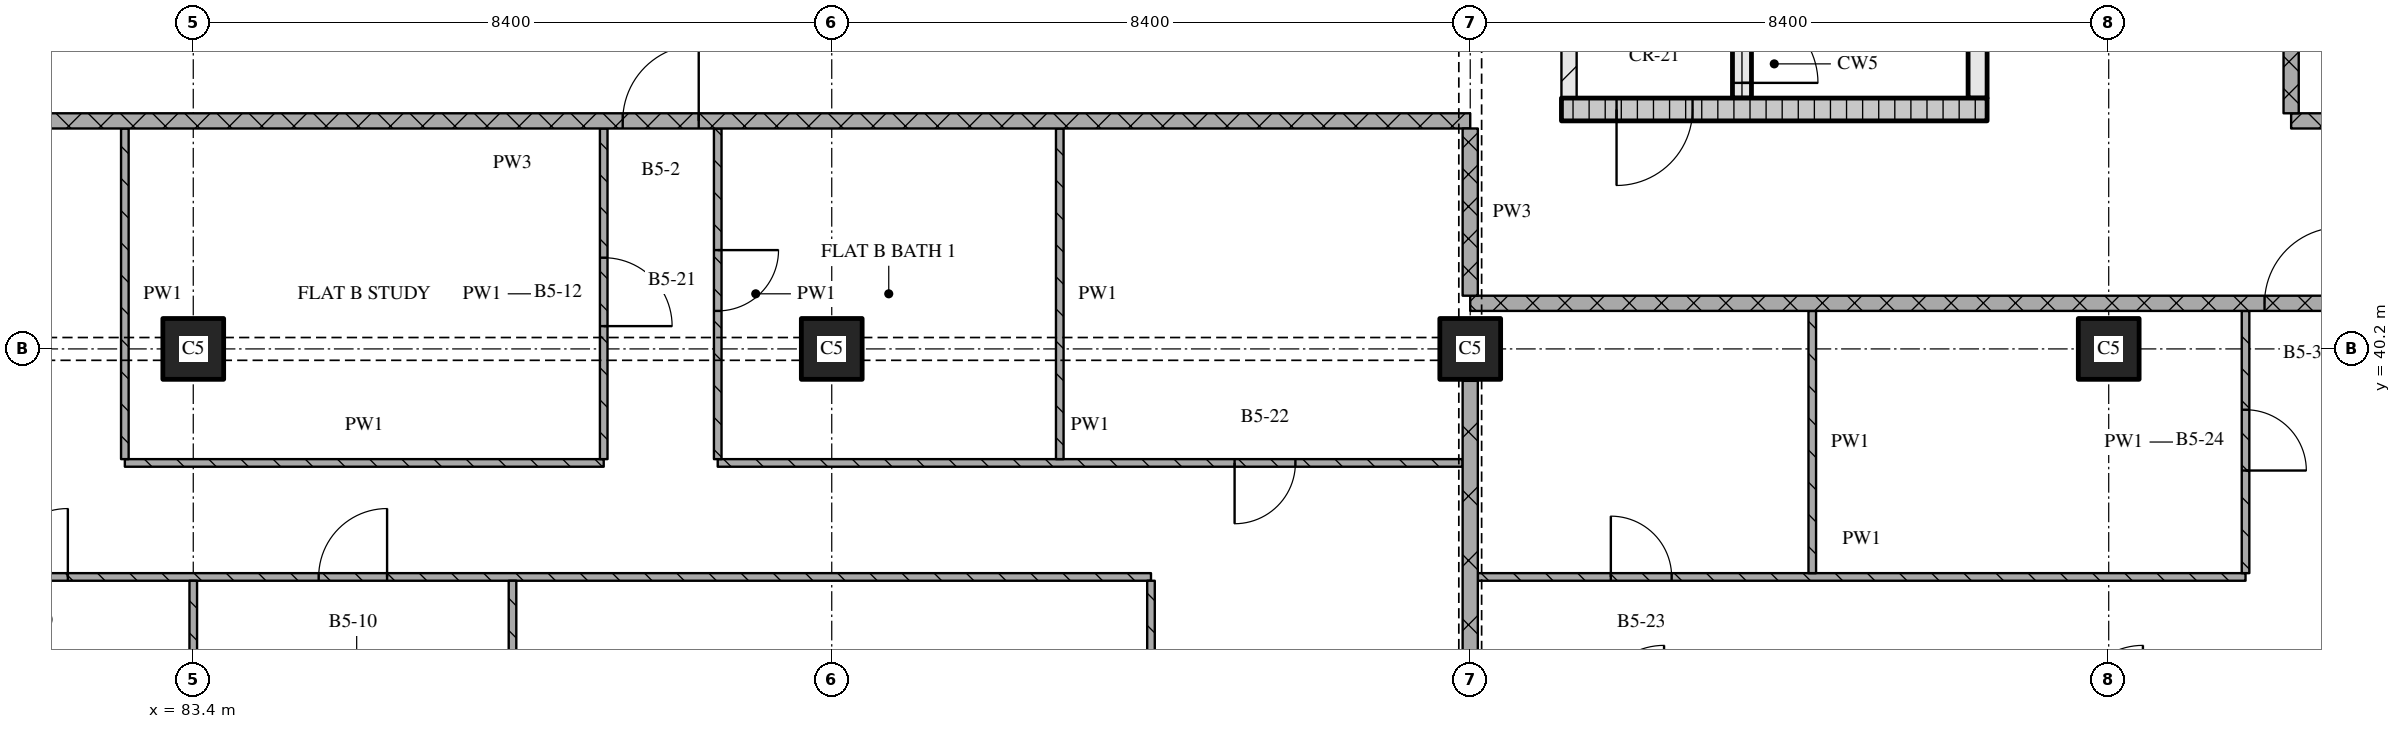
"""IFC4 building model, lengths in metres.
Left out: names, types, materials, properties, quantities, classifications, styles, units other than length and angle.
Written with IfcOpenShell. Run it as: python <this file> out.ifc"""

import sys

from ifc_helpers import new_model, si_unit, direction, frame, frame_2d, origin, origin_2d, place, context, subcontext, project, spatial, rectangle, extrude, element, fill, save


model = new_model("IFC4")
c1 = context("Model", 3, precision=1e-05, world=origin(), true_north=direction((0.0, 1.0)))
c2 = subcontext(c1, "Body", "Model", "MODEL_VIEW")
j1 = project(units=[si_unit("LENGTHUNIT", "METRE"), si_unit("PLANEANGLEUNIT", "RADIAN")], contexts=[c1])
p1 = place(None, origin())
s1 = spatial("IfcSite", under=j1, at=p1, CompositionType="ELEMENT")
p2 = place(p1, origin())
s2 = spatial("IfcBuilding", under=s1, at=p2, CompositionType="ELEMENT")
p3 = place(p2, frame((0.0, 0.0, 138.45)))
s3 = spatial("IfcBuildingStorey", under=s2, at=p3, CompositionType="ELEMENT", Elevation=138.45)
for number, where, z_axis, x_axis in (
    (1, (83.4, 40.2, 0.0), (0.0, 0.0, 1.0), (1.0, 0.0, 0.0)),
    (2, (91.8, 40.2, 0.0), (0.0, 0.0, 1.0), (1.0, 0.0, 0.0)),
    (3, (100.2, 40.2, 0.0), (0.0, 0.0, 1.0), (1.0, 0.0, 0.0)),
    (4, (108.6, 40.2, 0.0), (0.0, 0.0, 1.0), (1.0, 0.0, 0.0)),
):
    element("IfcColumn", number, at=place(p3, frame(where, z_axis=z_axis, x_axis=x_axis)), inside=s3, PredefinedType="COLUMN", context=c2, shape_type="SweptSolid", body=[
        extrude(rectangle(XDim=0.8, YDim=0.8, at=origin_2d()), origin(), (0.0, 0.0, 1.0), 3.6),
    ])
p4 = place(p3, frame((101.4, 43.35, 0.0), z_axis=(0.0, 0.0, 1.0), x_axis=(1.0, 0.0, 0.0)))
e5 = element("IfcWall", 5, at=p4, inside=s3, PredefinedType="SOLIDWALL", context=c2, shape_type="SweptSolid", body=[
    extrude(rectangle(XDim=5.6, YDim=0.3, at=frame_2d((2.8, 0.0))), origin(), (0.0, 0.0, 1.0), 3.3),
])
p5 = place(p4, frame((0.725, 0.0, 0.0)))
e6 = element("IfcOpeningElement", 6, at=p5, cuts=e5, PredefinedType="OPENING", context=c2, shape_type="SweptSolid", body=[
    extrude(rectangle(XDim=1.0, YDim=2.1, at=frame_2d((0.5, 1.05))), frame((0.0, 0.16, 0.0), z_axis=(0.0, -1.0, 0.0), x_axis=(1.0, 0.0, 0.0)), (0.0, 0.0, 1.0), 0.32),
])
p6 = place(p3, frame((101.5, 43.5, 0.0), z_axis=(0.0, 0.0, 1.0), x_axis=(0.0, 1.0, 0.0)))
e7 = element("IfcWall", 7, at=p6, inside=s3, PredefinedType="PARTITIONING", context=c2, shape_type="SweptSolid", body=[
    extrude(rectangle(XDim=6.9, YDim=0.2, at=frame_2d((3.45, 0.0))), origin(), (0.0, 0.0, 1.0), 3.3),
])
p7 = place(p6, frame((1.0, 0.0, 0.0)))
e8 = element("IfcOpeningElement", 8, at=p7, cuts=e7, PredefinedType="OPENING", context=c2, shape_type="SweptSolid", body=[
    extrude(rectangle(XDim=1.0, YDim=2.1, at=frame_2d((0.5, 1.05))), frame((0.0, 0.11, 0.0), z_axis=(0.0, -1.0, 0.0), x_axis=(1.0, 0.0, 0.0)), (0.0, 0.0, 1.0), 0.22),
])
p8 = place(p3, frame((103.775, 43.5, 0.0), z_axis=(0.0, 0.0, 1.0), x_axis=(0.0, 1.0, 0.0)))
e9 = element("IfcWall", 9, at=p8, inside=s3, PredefinedType="SOLIDWALL", context=c2, shape_type="SweptSolid", body=[
    extrude(rectangle(XDim=6.9, YDim=0.25, at=frame_2d((3.45, 0.0))), origin(), (0.0, 0.0, 1.0), 3.3),
])
p9 = place(p8, frame((0.2, 0.0, 0.0)))
e10 = element("IfcOpeningElement", 10, at=p9, cuts=e9, PredefinedType="OPENING", context=c2, shape_type="SweptSolid", body=[
    extrude(rectangle(XDim=1.0, YDim=2.1, at=frame_2d((0.5, 1.05))), frame((0.0, 0.135, 0.0), z_axis=(0.0, -1.0, 0.0), x_axis=(1.0, 0.0, 0.0)), (0.0, 0.0, 1.0), 0.27),
])
p10 = place(p3, frame((106.875, 43.5, 0.0), z_axis=(0.0, 0.0, 1.0), x_axis=(0.0, 1.0, 0.0)))
e11 = element("IfcWall", 11, at=p10, inside=s3, PredefinedType="SOLIDWALL", context=c2, shape_type="SweptSolid", body=[
    extrude(rectangle(XDim=6.9, YDim=0.25, at=frame_2d((3.45, 0.0))), origin(), (0.0, 0.0, 1.0), 3.3),
])
p11 = place(p3, frame((96.0, 37.2, 0.0), z_axis=(0.0, 0.0, 1.0), x_axis=(-1.0, 0.0, 0.0)))
e12 = element("IfcWall", 12, at=p11, inside=s3, PredefinedType="PARTITIONING", context=c2, shape_type="SweptSolid", body=[
    extrude(rectangle(XDim=20.9, YDim=0.1, at=frame_2d((10.45, 0.0))), origin(), (0.0, 0.0, 1.0), 3.3),
])
p12 = place(p11, frame((10.05, 0.0, 0.0)))
e13 = element("IfcOpeningElement", 13, at=p12, cuts=e12, PredefinedType="OPENING", context=c2, shape_type="SweptSolid", body=[
    extrude(rectangle(XDim=0.9, YDim=2.1, at=frame_2d((0.45, 1.05))), frame((0.0, 0.06, 0.0), z_axis=(0.0, -1.0, 0.0), x_axis=(1.0, 0.0, 0.0)), (0.0, 0.0, 1.0), 0.12),
])
p13 = place(p11, frame((14.25, 0.0, 0.0)))
e14 = element("IfcOpeningElement", 14, at=p13, cuts=e12, PredefinedType="OPENING", context=c2, shape_type="SweptSolid", body=[
    extrude(rectangle(XDim=0.9, YDim=2.1, at=frame_2d((0.45, 1.05))), frame((0.0, 0.06, 0.0), z_axis=(0.0, -1.0, 0.0), x_axis=(1.0, 0.0, 0.0)), (0.0, 0.0, 1.0), 0.12),
])
p14 = place(p11, frame((18.45, 0.0, 0.0)))
e15 = element("IfcOpeningElement", 15, at=p14, cuts=e12, PredefinedType="OPENING", context=c2, shape_type="SweptSolid", body=[
    extrude(rectangle(XDim=0.9, YDim=2.1, at=frame_2d((0.45, 1.05))), frame((0.0, 0.06, 0.0), z_axis=(0.0, -1.0, 0.0), x_axis=(1.0, 0.0, 0.0)), (0.0, 0.0, 1.0), 0.12),
])
p15 = place(p3, frame((100.3, 37.2, 0.0), z_axis=(0.0, 0.0, 1.0), x_axis=(1.0, 0.0, 0.0)))
e16 = element("IfcWall", 16, at=p15, inside=s3, PredefinedType="PARTITIONING", context=c2, shape_type="SweptSolid", body=[
    extrude(rectangle(XDim=10.1, YDim=0.1, at=frame_2d((5.05, 0.0))), origin(), (0.0, 0.0, 1.0), 3.3),
])
p16 = place(p15, frame((1.75, 0.0, 0.0)))
e17 = element("IfcOpeningElement", 17, at=p16, cuts=e16, PredefinedType="OPENING", context=c2, shape_type="SweptSolid", body=[
    extrude(rectangle(XDim=0.8, YDim=2.1, at=frame_2d((0.4, 1.05))), frame((0.0, 0.06, 0.0), z_axis=(0.0, -1.0, 0.0), x_axis=(1.0, 0.0, 0.0)), (0.0, 0.0, 1.0), 0.12),
])
p17 = place(p3, frame((82.5, 38.7, 0.0), z_axis=(0.0, 0.0, 1.0), x_axis=(1.0, 0.0, 0.0)))
e18 = element("IfcWall", 18, at=p17, inside=s3, PredefinedType="PARTITIONING", context=c2, shape_type="SweptSolid", body=[
    extrude(rectangle(XDim=6.3, YDim=0.1, at=frame_2d((3.15, 0.0))), origin(), (0.0, 0.0, 1.0), 3.3),
])
p18 = place(p3, frame((90.3, 38.7, 0.0), z_axis=(0.0, 0.0, 1.0), x_axis=(1.0, 0.0, 0.0)))
e19 = element("IfcWall", 19, at=p18, inside=s3, PredefinedType="PARTITIONING", context=c2, shape_type="SweptSolid", body=[
    extrude(rectangle(XDim=9.8, YDim=0.1, at=frame_2d((4.9, 0.0))), origin(), (0.0, 0.0, 1.0), 3.3),
])
p19 = place(p18, frame((6.8, 0.0, 0.0)))
e20 = element("IfcOpeningElement", 20, at=p19, cuts=e19, PredefinedType="OPENING", context=c2, shape_type="SweptSolid", body=[
    extrude(rectangle(XDim=0.8, YDim=2.1, at=frame_2d((0.4, 1.05))), frame((0.0, 0.06, 0.0), z_axis=(0.0, -1.0, 0.0), x_axis=(1.0, 0.0, 0.0)), (0.0, 0.0, 1.0), 0.12),
])
p20 = place(p3, frame((124.38, 40.8, 0.0), z_axis=(0.0, 0.0, 1.0), x_axis=(-1.0, 0.0, 0.0)))
e21 = element("IfcWall", 21, at=p20, inside=s3, PredefinedType="PARTITIONING", context=c2, shape_type="SweptSolid", body=[
    extrude(rectangle(XDim=24.18, YDim=0.2, at=frame_2d((12.09, 0.0))), origin(), (0.0, 0.0, 1.0), 3.3),
])
p21 = place(p20, frame((12.73, 0.0, 0.0)))
e22 = element("IfcOpeningElement", 22, at=p21, cuts=e21, PredefinedType="OPENING", context=c2, shape_type="SweptSolid", body=[
    extrude(rectangle(XDim=1.0, YDim=2.1, at=frame_2d((0.5, 1.05))), frame((0.0, 0.11, 0.0), z_axis=(0.0, -1.0, 0.0), x_axis=(1.0, 0.0, 0.0)), (0.0, 0.0, 1.0), 0.22),
])
p22 = place(p3, frame((100.2, 43.2, 0.0), z_axis=(0.0, 0.0, 1.0), x_axis=(-1.0, 0.0, 0.0)))
e23 = element("IfcWall", 23, at=p22, inside=s3, PredefinedType="PARTITIONING", context=c2, shape_type="SweptSolid", body=[
    extrude(rectangle(XDim=25.2, YDim=0.2, at=frame_2d((12.6, 0.0))), origin(), (0.0, 0.0, 1.0), 3.3),
])
p23 = place(p22, frame((10.15, 0.0, 0.0)))
e24 = element("IfcOpeningElement", 24, at=p23, cuts=e23, PredefinedType="OPENING", context=c2, shape_type="SweptSolid", body=[
    extrude(rectangle(XDim=1.0, YDim=2.1, at=frame_2d((0.5, 1.05))), frame((0.0, 0.11, 0.0), z_axis=(0.0, -1.0, 0.0), x_axis=(1.0, 0.0, 0.0)), (0.0, 0.0, 1.0), 0.22),
])
p24 = place(p3, frame((111.0, 43.2, 0.0), z_axis=(0.0, 0.0, 1.0), x_axis=(1.0, 0.0, 0.0)))
e25 = element("IfcWall", 25, at=p24, inside=s3, PredefinedType="PARTITIONING", context=c2, shape_type="SweptSolid", body=[
    extrude(rectangle(XDim=15.92, YDim=0.2, at=frame_2d((7.96, 0.0))), origin(), (0.0, 0.0, 1.0), 3.3),
])
p25 = place(p3, frame((82.5, 43.1, 0.0), z_axis=(0.0, 0.0, 1.0), x_axis=(0.0, -1.0, 0.0)))
e26 = element("IfcWall", 26, at=p25, inside=s3, PredefinedType="PARTITIONING", context=c2, shape_type="SweptSolid", body=[
    extrude(rectangle(XDim=4.35, YDim=0.1, at=frame_2d((2.175, 0.0))), origin(), (0.0, 0.0, 1.0), 3.3),
])
p26 = place(p3, frame((83.4, 37.15, 0.0), z_axis=(0.0, 0.0, 1.0), x_axis=(0.0, -1.0, 0.0)))
e27 = element("IfcWall", 27, at=p26, inside=s3, PredefinedType="PARTITIONING", context=c2, shape_type="SweptSolid", body=[
    extrude(rectangle(XDim=4.93, YDim=0.1, at=frame_2d((2.465, 0.0))), origin(), (0.0, 0.0, 1.0), 3.3),
])
p27 = place(p3, frame((87.6, 37.15, 0.0), z_axis=(0.0, 0.0, 1.0), x_axis=(0.0, -1.0, 0.0)))
e28 = element("IfcWall", 28, at=p27, inside=s3, PredefinedType="PARTITIONING", context=c2, shape_type="SweptSolid", body=[
    extrude(rectangle(XDim=6.87, YDim=0.1, at=frame_2d((3.435, 0.0))), origin(), (0.0, 0.0, 1.0), 3.3),
])
p28 = place(p3, frame((88.8, 38.75, 0.0), z_axis=(0.0, 0.0, 1.0), x_axis=(0.0, 1.0, 0.0)))
e29 = element("IfcWall", 29, at=p28, inside=s3, PredefinedType="PARTITIONING", context=c2, shape_type="SweptSolid", body=[
    extrude(rectangle(XDim=4.35, YDim=0.1, at=frame_2d((2.175, 0.0))), origin(), (0.0, 0.0, 1.0), 3.3),
])
p29 = place(p28, frame((1.75, 0.0, 0.0)))
e30 = element("IfcOpeningElement", 30, at=p29, cuts=e29, PredefinedType="OPENING", context=c2, shape_type="SweptSolid", body=[
    extrude(rectangle(XDim=0.9, YDim=2.1, at=frame_2d((0.45, 1.05))), frame((0.0, 0.06, 0.0), z_axis=(0.0, -1.0, 0.0), x_axis=(1.0, 0.0, 0.0)), (0.0, 0.0, 1.0), 0.12),
])
p30 = place(p3, frame((90.3, 43.1, 0.0), z_axis=(0.0, 0.0, 1.0), x_axis=(0.0, -1.0, 0.0)))
e31 = element("IfcWall", 31, at=p30, inside=s3, PredefinedType="PARTITIONING", context=c2, shape_type="SweptSolid", body=[
    extrude(rectangle(XDim=4.35, YDim=0.1, at=frame_2d((2.175, 0.0))), origin(), (0.0, 0.0, 1.0), 3.3),
])
p31 = place(p30, frame((1.6, 0.0, 0.0)))
e32 = element("IfcOpeningElement", 32, at=p31, cuts=e31, PredefinedType="OPENING", context=c2, shape_type="SweptSolid", body=[
    extrude(rectangle(XDim=0.8, YDim=2.1, at=frame_2d((0.4, 1.05))), frame((0.0, 0.06, 0.0), z_axis=(0.0, -1.0, 0.0), x_axis=(1.0, 0.0, 0.0)), (0.0, 0.0, 1.0), 0.12),
])
p32 = place(p3, frame((94.8, 43.1, 0.0), z_axis=(0.0, 0.0, 1.0), x_axis=(0.0, -1.0, 0.0)))
e33 = element("IfcWall", 33, at=p32, inside=s3, PredefinedType="PARTITIONING", context=c2, shape_type="SweptSolid", body=[
    extrude(rectangle(XDim=4.35, YDim=0.1, at=frame_2d((2.175, 0.0))), origin(), (0.0, 0.0, 1.0), 3.3),
])
p33 = place(p3, frame((96.0, 30.28, 0.0), z_axis=(0.0, 0.0, 1.0), x_axis=(0.0, 1.0, 0.0)))
e34 = element("IfcWall", 34, at=p33, inside=s3, PredefinedType="PARTITIONING", context=c2, shape_type="SweptSolid", body=[
    extrude(rectangle(XDim=6.87, YDim=0.1, at=frame_2d((3.435, 0.0))), origin(), (0.0, 0.0, 1.0), 3.3),
])
p34 = place(p33, frame((2.87, 0.0, 0.0)))
e35 = element("IfcOpeningElement", 35, at=p34, cuts=e34, PredefinedType="OPENING", context=c2, shape_type="SweptSolid", body=[
    extrude(rectangle(XDim=0.9, YDim=2.1, at=frame_2d((0.45, 1.05))), frame((0.0, 0.06, 0.0), z_axis=(0.0, -1.0, 0.0), x_axis=(1.0, 0.0, 0.0)), (0.0, 0.0, 1.0), 0.12),
])
p35 = place(p3, frame((100.2, 43.1, 0.0), z_axis=(0.0, 0.0, 1.0), x_axis=(0.0, -1.0, 0.0)))
e36 = element("IfcWall", 36, at=p35, inside=s3, PredefinedType="PARTITIONING", context=c2, shape_type="SweptSolid", body=[
    extrude(rectangle(XDim=2.2, YDim=0.2, at=frame_2d((1.1, 0.0))), origin(), (0.0, 0.0, 1.0), 2.41),
])
p36 = place(p3, frame((100.2, 39.78, 0.0), z_axis=(0.0, 0.0, 1.0), x_axis=(0.0, -1.0, 0.0)))
e37 = element("IfcWall", 37, at=p36, inside=s3, PredefinedType="PARTITIONING", context=c2, shape_type="SweptSolid", body=[
    extrude(rectangle(XDim=7.56, YDim=0.2, at=frame_2d((3.78, 0.0))), origin(), (0.0, 0.0, 1.0), 2.81),
])
p37 = place(p3, frame((104.7, 40.7, 0.0), z_axis=(0.0, 0.0, 1.0), x_axis=(0.0, -1.0, 0.0)))
e38 = element("IfcWall", 38, at=p37, inside=s3, PredefinedType="PARTITIONING", context=c2, shape_type="SweptSolid", body=[
    extrude(rectangle(XDim=3.45, YDim=0.1, at=frame_2d((1.725, 0.0))), origin(), (0.0, 0.0, 1.0), 3.3),
])
p38 = place(p3, frame((110.4, 37.25, 0.0), z_axis=(0.0, 0.0, 1.0), x_axis=(0.0, 1.0, 0.0)))
e39 = element("IfcWall", 39, at=p38, inside=s3, PredefinedType="PARTITIONING", context=c2, shape_type="SweptSolid", body=[
    extrude(rectangle(XDim=3.45, YDim=0.1, at=frame_2d((1.725, 0.0))), origin(), (0.0, 0.0, 1.0), 3.3),
])
p39 = place(p38, frame((1.35, 0.0, 0.0)))
e40 = element("IfcOpeningElement", 40, at=p39, cuts=e39, PredefinedType="OPENING", context=c2, shape_type="SweptSolid", body=[
    extrude(rectangle(XDim=0.8, YDim=2.1, at=frame_2d((0.4, 1.05))), frame((0.0, 0.06, 0.0), z_axis=(0.0, -1.0, 0.0), x_axis=(1.0, 0.0, 0.0)), (0.0, 0.0, 1.0), 0.12),
])
p40 = place(p3, frame((111.0, 75.32, 0.0), z_axis=(0.0, 0.0, 1.0), x_axis=(0.0, -1.0, 0.0)))
e41 = element("IfcWall", 41, at=p40, inside=s3, PredefinedType="PARTITIONING", context=c2, shape_type="SweptSolid", body=[
    extrude(rectangle(XDim=32.02, YDim=0.2, at=frame_2d((16.01, 0.0))), origin(), (0.0, 0.0, 1.0), 3.3),
])
p41 = place(p40, frame((4.579, 0.0, 0.0)))
e42 = element("IfcOpeningElement", 42, at=p41, cuts=e41, PredefinedType="OPENING", context=c2, shape_type="SweptSolid", body=[
    extrude(rectangle(XDim=1.2, YDim=2.1, at=frame_2d((0.6, 1.05))), frame((0.0, 0.11, 0.0), z_axis=(0.0, -1.0, 0.0), x_axis=(1.0, 0.0, 0.0)), (0.0, 0.0, 1.0), 0.22),
])
p42 = place(p40, frame((13.52, 0.0, 0.0)))
e43 = element("IfcOpeningElement", 43, at=p42, cuts=e41, PredefinedType="OPENING", context=c2, shape_type="SweptSolid", body=[
    extrude(rectangle(XDim=1.2, YDim=2.1, at=frame_2d((0.6, 1.05))), frame((0.0, 0.11, 0.0), z_axis=(0.0, -1.0, 0.0), x_axis=(1.0, 0.0, 0.0)), (0.0, 0.0, 1.0), 0.22),
])
p43 = place(p40, frame((23.27, 0.0, 0.0)))
e44 = element("IfcOpeningElement", 44, at=p43, cuts=e41, PredefinedType="OPENING", context=c2, shape_type="SweptSolid", body=[
    extrude(rectangle(XDim=1.2, YDim=2.1, at=frame_2d((0.6, 1.05))), frame((0.0, 0.11, 0.0), z_axis=(0.0, -1.0, 0.0), x_axis=(1.0, 0.0, 0.0)), (0.0, 0.0, 1.0), 0.22),
])
p44 = place(p5, origin())
e45 = element("IfcDoor", 45, at=p44, inside=s3, OperationType="SINGLE_SWING_RIGHT", PredefinedType="DOOR", context=c2, shape_type="SweptSolid", body=[
    extrude(rectangle(XDim=1.0, YDim=2.1, at=frame_2d((0.5, 1.05))), frame((0.0, 0.025, 0.0), z_axis=(0.0, -1.0, 0.0), x_axis=(1.0, 0.0, 0.0)), (0.0, 0.0, 1.0), 0.05),
])
fill(e6, e45)
p45 = place(p9, origin())
e46 = element("IfcDoor", 46, at=p45, inside=s3, OperationType="SINGLE_SWING_RIGHT", PredefinedType="DOOR", context=c2, shape_type="SweptSolid", body=[
    extrude(rectangle(XDim=1.0, YDim=2.1, at=frame_2d((0.5, 1.05))), frame((0.0, 0.025, 0.0), z_axis=(0.0, -1.0, 0.0), x_axis=(1.0, 0.0, 0.0)), (0.0, 0.0, 1.0), 0.05),
])
fill(e10, e46)
p46 = place(p12, origin())
e47 = element("IfcDoor", 47, at=p46, inside=s3, OperationType="SINGLE_SWING_RIGHT", PredefinedType="DOOR", context=c2, shape_type="SweptSolid", body=[
    extrude(rectangle(XDim=0.9, YDim=2.1, at=frame_2d((0.45, 1.05))), frame((0.0, 0.025, 0.0), z_axis=(0.0, -1.0, 0.0), x_axis=(1.0, 0.0, 0.0)), (0.0, 0.0, 1.0), 0.05),
])
fill(e13, e47)
p47 = place(p13, origin())
e48 = element("IfcDoor", 48, at=p47, inside=s3, OperationType="SINGLE_SWING_RIGHT", PredefinedType="DOOR", context=c2, shape_type="SweptSolid", body=[
    extrude(rectangle(XDim=0.9, YDim=2.1, at=frame_2d((0.45, 1.05))), frame((0.0, 0.025, 0.0), z_axis=(0.0, -1.0, 0.0), x_axis=(1.0, 0.0, 0.0)), (0.0, 0.0, 1.0), 0.05),
])
fill(e14, e48)
p48 = place(p16, origin())
e49 = element("IfcDoor", 49, at=p48, inside=s3, OperationType="SINGLE_SWING_LEFT", PredefinedType="DOOR", context=c2, shape_type="SweptSolid", body=[
    extrude(rectangle(XDim=0.8, YDim=2.1, at=frame_2d((0.4, 1.05))), frame((0.0, 0.025, 0.0), z_axis=(0.0, -1.0, 0.0), x_axis=(1.0, 0.0, 0.0)), (0.0, 0.0, 1.0), 0.05),
])
fill(e17, e49)
p49 = place(p19, origin())
e50 = element("IfcDoor", 50, at=p49, inside=s3, OperationType="SINGLE_SWING_RIGHT", PredefinedType="DOOR", context=c2, shape_type="SweptSolid", body=[
    extrude(rectangle(XDim=0.8, YDim=2.1, at=frame_2d((0.4, 1.05))), frame((0.0, 0.025, 0.0), z_axis=(0.0, -1.0, 0.0), x_axis=(1.0, 0.0, 0.0)), (0.0, 0.0, 1.0), 0.05),
])
fill(e20, e50)
p50 = place(p21, origin())
e51 = element("IfcDoor", 51, at=p50, inside=s3, OperationType="SINGLE_SWING_RIGHT", PredefinedType="DOOR", context=c2, shape_type="SweptSolid", body=[
    extrude(rectangle(XDim=1.0, YDim=2.1, at=frame_2d((0.5, 1.05))), frame((0.0, 0.025, 0.0), z_axis=(0.0, -1.0, 0.0), x_axis=(1.0, 0.0, 0.0)), (0.0, 0.0, 1.0), 0.05),
])
fill(e22, e51)
p51 = place(p23, origin())
e52 = element("IfcDoor", 52, at=p51, inside=s3, OperationType="SINGLE_SWING_RIGHT", PredefinedType="DOOR", context=c2, shape_type="SweptSolid", body=[
    extrude(rectangle(XDim=1.0, YDim=2.1, at=frame_2d((0.5, 1.05))), frame((0.0, 0.025, 0.0), z_axis=(0.0, -1.0, 0.0), x_axis=(1.0, 0.0, 0.0)), (0.0, 0.0, 1.0), 0.05),
])
fill(e24, e52)
p52 = place(p29, origin())
e53 = element("IfcDoor", 53, at=p52, inside=s3, OperationType="SINGLE_SWING_RIGHT", PredefinedType="DOOR", context=c2, shape_type="SweptSolid", body=[
    extrude(rectangle(XDim=0.9, YDim=2.1, at=frame_2d((0.45, 1.05))), frame((0.0, 0.025, 0.0), z_axis=(0.0, -1.0, 0.0), x_axis=(1.0, 0.0, 0.0)), (0.0, 0.0, 1.0), 0.05),
])
fill(e30, e53)
p53 = place(p31, origin())
e54 = element("IfcDoor", 54, at=p53, inside=s3, OperationType="SINGLE_SWING_LEFT", PredefinedType="DOOR", context=c2, shape_type="SweptSolid", body=[
    extrude(rectangle(XDim=0.8, YDim=2.1, at=frame_2d((0.4, 1.05))), frame((0.0, 0.025, 0.0), z_axis=(0.0, -1.0, 0.0), x_axis=(1.0, 0.0, 0.0)), (0.0, 0.0, 1.0), 0.05),
])
fill(e32, e54)
p54 = place(p39, origin())
e55 = element("IfcDoor", 55, at=p54, inside=s3, OperationType="SINGLE_SWING_RIGHT", PredefinedType="DOOR", context=c2, shape_type="SweptSolid", body=[
    extrude(rectangle(XDim=0.8, YDim=2.1, at=frame_2d((0.4, 1.05))), frame((0.0, 0.025, 0.0), z_axis=(0.0, -1.0, 0.0), x_axis=(1.0, 0.0, 0.0)), (0.0, 0.0, 1.0), 0.05),
])
fill(e40, e55)
save(model, sys.argv[1])
